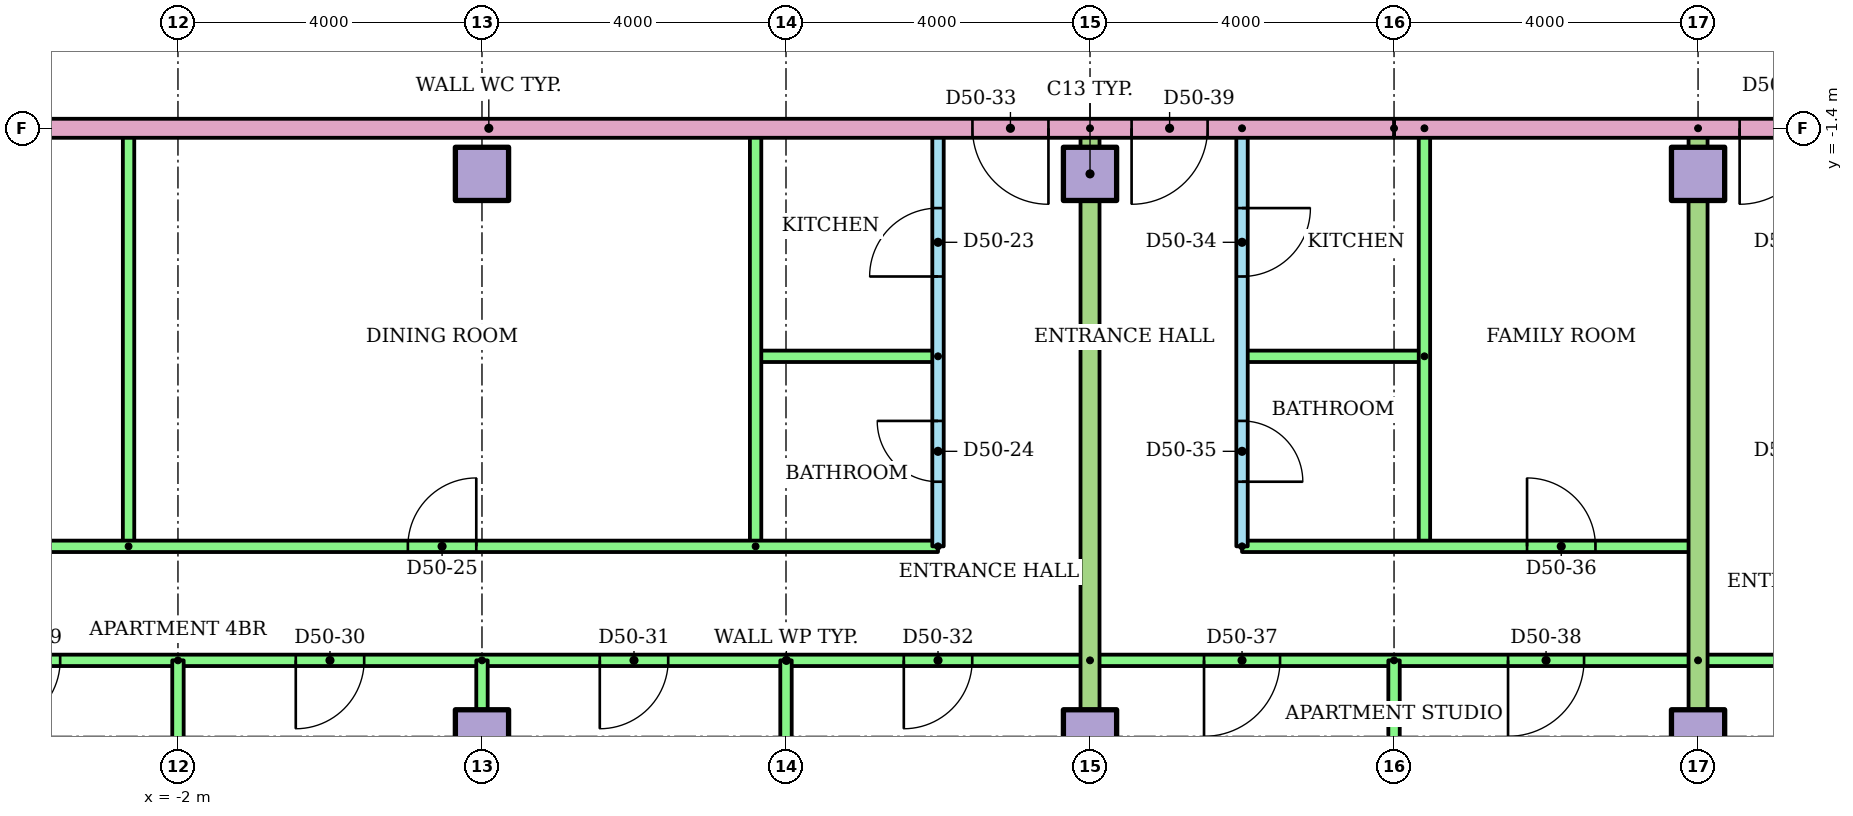
"""IFC4 building model, lengths in metres.
Left out: names, types, materials, properties, quantities, classifications, styles, units other than length and angle.
Written with IfcOpenShell. Run it as: python <this file> out.ifc"""

import sys

from ifc_helpers import new_model, si_unit, direction, frame, frame_2d, origin, origin_2d, place, context, subcontext, project, spatial, rectangle, extrude, element, fill, save


model = new_model("IFC4")
c1 = context("Model", 3, precision=1e-05, world=origin(), true_north=direction((0.0, 1.0)))
c2 = subcontext(c1, "Body", "Model", "MODEL_VIEW")
j1 = project(units=[si_unit("LENGTHUNIT", "METRE"), si_unit("PLANEANGLEUNIT", "RADIAN")], contexts=[c1])
p1 = place(None, origin())
s1 = spatial("IfcSite", under=j1, at=p1, CompositionType="ELEMENT")
p2 = place(p1, origin())
s2 = spatial("IfcBuilding", under=s1, at=p2, CompositionType="ELEMENT")
p3 = place(p2, frame((0.0, 0.0, 190.9)))
s3 = spatial("IfcBuildingStorey", under=s2, at=p3, CompositionType="ELEMENT", Elevation=190.9)
for number, where in (
    (1, (2.0, -9.4, 0.0)),
    (2, (10.0, -9.4, 0.0)),
    (3, (18.0, -9.4, 0.0)),
    (4, (2.0, -2.0, 0.0)),
    (5, (10.0, -2.0, 0.0)),
    (6, (18.0, -2.0, 0.0)),
):
    element("IfcColumn", number, at=place(p3, frame(where)), inside=s3, PredefinedType="COLUMN", context=c2, shape_type="SweptSolid", body=[
        extrude(rectangle(XDim=0.7, YDim=0.7, at=origin_2d()), origin(), (0.0, 0.0, 1.0), 3.2),
    ])
p4 = place(p3, frame((8.0, -6.9, 0.0), z_axis=(0.0, 0.0, 1.0), x_axis=(0.0, 1.0, 0.0)))
e7 = element("IfcWall", 7, at=p4, inside=s3, PredefinedType="PARTITIONING", context=c2, shape_type="SweptSolid", body=[
    extrude(rectangle(XDim=5.5, YDim=0.15, at=frame_2d((2.75, 0.0))), origin(), (0.0, 0.0, 1.0), 2.4),
])
p5 = place(p4, frame((3.55, 0.0, 0.0)))
e8 = element("IfcOpeningElement", 8, at=p5, cuts=e7, PredefinedType="OPENING", context=c2, shape_type="SweptSolid", body=[
    extrude(rectangle(XDim=0.9, YDim=2.1, at=frame_2d((0.45, 1.05))), frame((0.0, 0.085, 0.0), z_axis=(0.0, -1.0, 0.0), x_axis=(1.0, 0.0, 0.0)), (0.0, 0.0, 1.0), 0.17),
])
p6 = place(p4, frame((0.85, 0.0, 0.0)))
e9 = element("IfcOpeningElement", 9, at=p6, cuts=e7, PredefinedType="OPENING", context=c2, shape_type="SweptSolid", body=[
    extrude(rectangle(XDim=0.8, YDim=2.1, at=frame_2d((0.4, 1.05))), frame((0.0, 0.085, 0.0), z_axis=(0.0, -1.0, 0.0), x_axis=(1.0, 0.0, 0.0)), (0.0, 0.0, 1.0), 0.17),
])
p7 = place(p3, frame((8.0, -4.4, 0.0), z_axis=(0.0, 0.0, 1.0), x_axis=(-1.0, 0.0, 0.0)))
e10 = element("IfcWall", 10, at=p7, inside=s3, PredefinedType="PARTITIONING", context=c2, shape_type="SweptSolid", body=[
    extrude(rectangle(XDim=2.4, YDim=0.15, at=frame_2d((1.2, 0.0))), origin(), (0.0, 0.0, 1.0), 2.4),
])
for number, where, z_axis, x_axis in (
    (11, (5.6, -6.9, 0.0), (0.0, 0.0, 1.0), (0.0, 1.0, 0.0)),
    (12, (-2.65, -6.9, 0.0), (0.0, 0.0, 1.0), (0.0, 1.0, 0.0)),
):
    element("IfcWall", number, at=place(p3, frame(where, z_axis=z_axis, x_axis=x_axis)), inside=s3, PredefinedType="PARTITIONING", context=c2, shape_type="SweptSolid", body=[
        extrude(rectangle(XDim=5.5, YDim=0.15, at=frame_2d((2.75, 0.0))), origin(), (0.0, 0.0, 1.0), 2.4),
    ])
p8 = place(p3, frame((-14.0, -6.9, 0.0)))
e13 = element("IfcWall", 13, at=p8, inside=s3, PredefinedType="PARTITIONING", context=c2, shape_type="SweptSolid", body=[
    extrude(rectangle(XDim=22.0, YDim=0.15, at=frame_2d((11.0, 0.0))), origin(), (0.0, 0.0, 1.0), 2.4),
])
p9 = place(p8, frame((15.025, 0.0, 0.0)))
e14 = element("IfcOpeningElement", 14, at=p9, cuts=e13, PredefinedType="OPENING", context=c2, shape_type="SweptSolid", body=[
    extrude(rectangle(XDim=0.9, YDim=2.1, at=frame_2d((0.45, 1.05))), frame((0.0, 0.085, 0.0), z_axis=(0.0, -1.0, 0.0), x_axis=(1.0, 0.0, 0.0)), (0.0, 0.0, 1.0), 0.17),
])
p10 = place(p8, frame((7.65, 0.0, 0.0)))
e15 = element("IfcOpeningElement", 15, at=p10, cuts=e13, PredefinedType="OPENING", context=c2, shape_type="SweptSolid", body=[
    extrude(rectangle(XDim=0.9, YDim=2.1, at=frame_2d((0.45, 1.05))), frame((0.0, 0.085, 0.0), z_axis=(0.0, -1.0, 0.0), x_axis=(1.0, 0.0, 0.0)), (0.0, 0.0, 1.0), 0.17),
])
p11 = place(p8, frame((1.975, 0.0, 0.0)))
e16 = element("IfcOpeningElement", 16, at=p11, cuts=e13, PredefinedType="OPENING", context=c2, shape_type="SweptSolid", body=[
    extrude(rectangle(XDim=0.9, YDim=2.1, at=frame_2d((0.45, 1.05))), frame((0.0, 0.085, 0.0), z_axis=(0.0, -1.0, 0.0), x_axis=(1.0, 0.0, 0.0)), (0.0, 0.0, 1.0), 0.17),
])
p12 = place(p3, frame((10.0, -8.4, 0.0), z_axis=(0.0, 0.0, 1.0), x_axis=(-1.0, 0.0, 0.0)))
e17 = element("IfcWall", 17, at=p12, inside=s3, PredefinedType="PARTITIONING", context=c2, shape_type="SweptSolid", body=[
    extrude(rectangle(XDim=24.0, YDim=0.15, at=frame_2d((12.0, 0.0))), origin(), (0.0, 0.0, 1.0), 2.4),
])
p13 = place(p12, frame((19.5, 0.0, 0.0)))
e18 = element("IfcOpeningElement", 18, at=p13, cuts=e17, PredefinedType="OPENING", context=c2, shape_type="SweptSolid", body=[
    extrude(rectangle(XDim=1.0, YDim=2.1, at=frame_2d((0.5, 1.05))), frame((0.0, 0.085, 0.0), z_axis=(0.0, -1.0, 0.0), x_axis=(1.0, 0.0, 0.0)), (0.0, 0.0, 1.0), 0.17),
])
p14 = place(p12, frame((13.55, 0.0, 0.0)))
e19 = element("IfcOpeningElement", 19, at=p14, cuts=e17, PredefinedType="OPENING", context=c2, shape_type="SweptSolid", body=[
    extrude(rectangle(XDim=0.9, YDim=2.1, at=frame_2d((0.45, 1.05))), frame((0.0, 0.085, 0.0), z_axis=(0.0, -1.0, 0.0), x_axis=(1.0, 0.0, 0.0)), (0.0, 0.0, 1.0), 0.17),
])
p15 = place(p12, frame((9.55, 0.0, 0.0)))
e20 = element("IfcOpeningElement", 20, at=p15, cuts=e17, PredefinedType="OPENING", context=c2, shape_type="SweptSolid", body=[
    extrude(rectangle(XDim=0.9, YDim=2.1, at=frame_2d((0.45, 1.05))), frame((0.0, 0.085, 0.0), z_axis=(0.0, -1.0, 0.0), x_axis=(1.0, 0.0, 0.0)), (0.0, 0.0, 1.0), 0.17),
])
p16 = place(p12, frame((5.55, 0.0, 0.0)))
e21 = element("IfcOpeningElement", 21, at=p16, cuts=e17, PredefinedType="OPENING", context=c2, shape_type="SweptSolid", body=[
    extrude(rectangle(XDim=0.9, YDim=2.1, at=frame_2d((0.45, 1.05))), frame((0.0, 0.085, 0.0), z_axis=(0.0, -1.0, 0.0), x_axis=(1.0, 0.0, 0.0)), (0.0, 0.0, 1.0), 0.17),
])
p17 = place(p12, frame((1.55, 0.0, 0.0)))
e22 = element("IfcOpeningElement", 22, at=p17, cuts=e17, PredefinedType="OPENING", context=c2, shape_type="SweptSolid", body=[
    extrude(rectangle(XDim=0.9, YDim=2.1, at=frame_2d((0.45, 1.05))), frame((0.0, 0.085, 0.0), z_axis=(0.0, -1.0, 0.0), x_axis=(1.0, 0.0, 0.0)), (0.0, 0.0, 1.0), 0.17),
])
p18 = place(p3, frame((-2.0, -8.4, 0.0), z_axis=(0.0, 0.0, 1.0), x_axis=(0.0, -1.0, 0.0)))
e23 = element("IfcWall", 23, at=p18, inside=s3, PredefinedType="PARTITIONING", context=c2, shape_type="SweptSolid", body=[
    extrude(rectangle(XDim=8.021, YDim=0.15, at=frame_2d((4.01, 0.0))), origin(), (0.0, 0.0, 1.0), 2.4),
])
p19 = place(p3, frame((2.0, -8.4, 0.0), z_axis=(0.0, 0.0, 1.0), x_axis=(0.0, -1.0, 0.0)))
e24 = element("IfcWall", 24, at=p19, inside=s3, PredefinedType="PARTITIONING", context=c2, shape_type="SweptSolid", body=[
    extrude(rectangle(XDim=8.01, YDim=0.15, at=frame_2d((4.005, 0.0))), origin(), (0.0, 0.0, 1.0), 2.4),
])
p20 = place(p3, frame((6.0, -8.4, 0.0), z_axis=(0.0, 0.0, 1.0), x_axis=(0.0, -1.0, 0.0)))
e25 = element("IfcWall", 25, at=p20, inside=s3, PredefinedType="PARTITIONING", context=c2, shape_type="SweptSolid", body=[
    extrude(rectangle(XDim=8.021, YDim=0.15, at=frame_2d((4.01, 0.0))), origin(), (0.0, 0.0, 1.0), 2.4),
])
p21 = place(p3, frame((12.0, -1.4, 0.0), z_axis=(0.0, 0.0, 1.0), x_axis=(0.0, -1.0, 0.0)))
e26 = element("IfcWall", 26, at=p21, inside=s3, PredefinedType="PARTITIONING", context=c2, shape_type="SweptSolid", body=[
    extrude(rectangle(XDim=5.5, YDim=0.15, at=frame_2d((2.75, 0.0))), origin(), (0.0, 0.0, 1.0), 2.4),
])
p22 = place(p21, frame((1.05, 0.0, 0.0)))
e27 = element("IfcOpeningElement", 27, at=p22, cuts=e26, PredefinedType="OPENING", context=c2, shape_type="SweptSolid", body=[
    extrude(rectangle(XDim=0.9, YDim=2.1, at=frame_2d((0.45, 1.05))), frame((0.0, 0.085, 0.0), z_axis=(0.0, -1.0, 0.0), x_axis=(1.0, 0.0, 0.0)), (0.0, 0.0, 1.0), 0.17),
])
p23 = place(p21, frame((3.85, 0.0, 0.0)))
e28 = element("IfcOpeningElement", 28, at=p23, cuts=e26, PredefinedType="OPENING", context=c2, shape_type="SweptSolid", body=[
    extrude(rectangle(XDim=0.8, YDim=2.1, at=frame_2d((0.4, 1.05))), frame((0.0, 0.085, 0.0), z_axis=(0.0, -1.0, 0.0), x_axis=(1.0, 0.0, 0.0)), (0.0, 0.0, 1.0), 0.17),
])
p24 = place(p3, frame((14.4, -4.4, 0.0), z_axis=(0.0, 0.0, 1.0), x_axis=(-1.0, 0.0, 0.0)))
e29 = element("IfcWall", 29, at=p24, inside=s3, PredefinedType="PARTITIONING", context=c2, shape_type="SweptSolid", body=[
    extrude(rectangle(XDim=2.4, YDim=0.15, at=frame_2d((1.2, 0.0))), origin(), (0.0, 0.0, 1.0), 2.4),
])
p25 = place(p3, frame((14.4, -1.4, 0.0), z_axis=(0.0, 0.0, 1.0), x_axis=(0.0, -1.0, 0.0)))
e30 = element("IfcWall", 30, at=p25, inside=s3, PredefinedType="PARTITIONING", context=c2, shape_type="SweptSolid", body=[
    extrude(rectangle(XDim=5.5, YDim=0.15, at=frame_2d((2.75, 0.0))), origin(), (0.0, 0.0, 1.0), 2.4),
])
p26 = place(p3, frame((12.0, -6.9, 0.0)))
e31 = element("IfcWall", 31, at=p26, inside=s3, PredefinedType="PARTITIONING", context=c2, shape_type="SweptSolid", body=[
    extrude(rectangle(XDim=6.0, YDim=0.15, at=frame_2d((3.0, 0.0))), origin(), (0.0, 0.0, 1.0), 2.4),
])
p27 = place(p26, frame((3.75, 0.0, 0.0)))
e32 = element("IfcOpeningElement", 32, at=p27, cuts=e31, PredefinedType="OPENING", context=c2, shape_type="SweptSolid", body=[
    extrude(rectangle(XDim=0.9, YDim=2.1, at=frame_2d((0.45, 1.05))), frame((0.0, 0.085, 0.0), z_axis=(0.0, -1.0, 0.0), x_axis=(1.0, 0.0, 0.0)), (0.0, 0.0, 1.0), 0.17),
])
p28 = place(p3, frame((18.0, -8.4, 0.0), z_axis=(0.0, 0.0, 1.0), x_axis=(-1.0, 0.0, 0.0)))
e33 = element("IfcWall", 33, at=p28, inside=s3, PredefinedType="PARTITIONING", context=c2, shape_type="SweptSolid", body=[
    extrude(rectangle(XDim=8.0, YDim=0.15, at=frame_2d((4.0, 0.0))), origin(), (0.0, 0.0, 1.0), 2.4),
])
p29 = place(p28, frame((5.5, 0.0, 0.0)))
e34 = element("IfcOpeningElement", 34, at=p29, cuts=e33, PredefinedType="OPENING", context=c2, shape_type="SweptSolid", body=[
    extrude(rectangle(XDim=1.0, YDim=2.1, at=frame_2d((0.5, 1.05))), frame((0.0, 0.085, 0.0), z_axis=(0.0, -1.0, 0.0), x_axis=(1.0, 0.0, 0.0)), (0.0, 0.0, 1.0), 0.17),
])
p30 = place(p28, frame((1.5, 0.0, 0.0)))
e35 = element("IfcOpeningElement", 35, at=p30, cuts=e33, PredefinedType="OPENING", context=c2, shape_type="SweptSolid", body=[
    extrude(rectangle(XDim=1.0, YDim=2.1, at=frame_2d((0.5, 1.05))), frame((0.0, 0.085, 0.0), z_axis=(0.0, -1.0, 0.0), x_axis=(1.0, 0.0, 0.0)), (0.0, 0.0, 1.0), 0.17),
])
p31 = place(p3, frame((14.0, -8.4, 0.0), z_axis=(0.0, 0.0, 1.0), x_axis=(0.0, -1.0, 0.0)))
e36 = element("IfcWall", 36, at=p31, inside=s3, PredefinedType="PARTITIONING", context=c2, shape_type="SweptSolid", body=[
    extrude(rectangle(XDim=8.021, YDim=0.15, at=frame_2d((4.01, 0.0))), origin(), (0.0, 0.0, 1.0), 2.4),
])
p32 = place(p3, frame((10.0, -1.4, 0.0), z_axis=(0.0, 0.0, 1.0), x_axis=(0.0, -1.0, 0.0)))
e37 = element("IfcWall", 37, at=p32, inside=s3, PredefinedType="PARTITIONING", context=c2, shape_type="SweptSolid", body=[
    extrude(rectangle(XDim=15.01, YDim=0.25, at=frame_2d((7.505, 0.0))), origin(), (0.0, 0.0, 1.0), 2.4),
])
p33 = place(p3, frame((36.82, -8.4, 0.0), z_axis=(0.0, 0.0, 1.0), x_axis=(-1.0, 0.0, 0.0)))
e38 = element("IfcWall", 38, at=p33, inside=s3, PredefinedType="PARTITIONING", context=c2, shape_type="SweptSolid", body=[
    extrude(rectangle(XDim=18.82, YDim=0.15, at=frame_2d((9.41, 0.0))), origin(), (0.0, 0.0, 1.0), 2.4),
])
p34 = place(p33, frame((16.37, 0.0, 0.0)))
e39 = element("IfcOpeningElement", 39, at=p34, cuts=e38, PredefinedType="OPENING", context=c2, shape_type="SweptSolid", body=[
    extrude(rectangle(XDim=0.9, YDim=2.1, at=frame_2d((0.45, 1.05))), frame((0.0, 0.085, 0.0), z_axis=(0.0, -1.0, 0.0), x_axis=(1.0, 0.0, 0.0)), (0.0, 0.0, 1.0), 0.17),
])
p35 = place(p33, frame((12.37, 0.0, 0.0)))
e40 = element("IfcOpeningElement", 40, at=p35, cuts=e38, PredefinedType="OPENING", context=c2, shape_type="SweptSolid", body=[
    extrude(rectangle(XDim=0.9, YDim=2.1, at=frame_2d((0.45, 1.05))), frame((0.0, 0.085, 0.0), z_axis=(0.0, -1.0, 0.0), x_axis=(1.0, 0.0, 0.0)), (0.0, 0.0, 1.0), 0.17),
])
p36 = place(p33, frame((7.27, 0.0, 0.0)))
e41 = element("IfcOpeningElement", 41, at=p36, cuts=e38, PredefinedType="OPENING", context=c2, shape_type="SweptSolid", body=[
    extrude(rectangle(XDim=1.0, YDim=2.1, at=frame_2d((0.5, 1.05))), frame((0.0, 0.085, 0.0), z_axis=(0.0, -1.0, 0.0), x_axis=(1.0, 0.0, 0.0)), (0.0, 0.0, 1.0), 0.17),
])
p37 = place(p33, frame((1.373, 0.0, 0.0)))
e42 = element("IfcOpeningElement", 42, at=p37, cuts=e38, PredefinedType="OPENING", context=c2, shape_type="SweptSolid", body=[
    extrude(rectangle(XDim=0.9, YDim=2.1, at=frame_2d((0.45, 1.05))), frame((0.0, 0.085, 0.0), z_axis=(0.0, -1.0, 0.0), x_axis=(1.0, 0.0, 0.0)), (0.0, 0.0, 1.0), 0.17),
])
p38 = place(p3, frame((18.0, -1.4, 0.0), z_axis=(0.0, 0.0, 1.0), x_axis=(0.0, -1.0, 0.0)))
e43 = element("IfcWall", 43, at=p38, inside=s3, PredefinedType="PARTITIONING", context=c2, shape_type="SweptSolid", body=[
    extrude(rectangle(XDim=15.01, YDim=0.25, at=frame_2d((7.505, 0.0))), origin(), (0.0, 0.0, 1.0), 2.4),
])
p39 = place(p3, frame((29.0, -1.4, 0.0), z_axis=(0.0, 0.0, 1.0), x_axis=(-1.0, 0.0, 0.0)))
e44 = element("IfcWall", 44, at=p39, inside=s3, PredefinedType="PARTITIONING", context=c2, shape_type="SweptSolid", body=[
    extrude(rectangle(XDim=15.0, YDim=0.25, at=frame_2d((7.5, 0.0))), origin(), (0.0, 0.0, 1.0), 2.4),
])
p40 = place(p39, frame((9.453, 0.0, 0.0)))
e45 = element("IfcOpeningElement", 45, at=p40, cuts=e44, PredefinedType="OPENING", context=c2, shape_type="SweptSolid", body=[
    extrude(rectangle(XDim=1.0, YDim=2.1, at=frame_2d((0.5, 1.05))), frame((0.0, 0.135, 0.0), z_axis=(0.0, -1.0, 0.0), x_axis=(1.0, 0.0, 0.0)), (0.0, 0.0, 1.0), 0.27),
])
p41 = place(p3, frame((14.0, -1.4, 0.0), z_axis=(0.0, 0.0, 1.0), x_axis=(-1.0, 0.0, 0.0)))
e46 = element("IfcWall", 46, at=p41, inside=s3, PredefinedType="PARTITIONING", context=c2, shape_type="SweptSolid", body=[
    extrude(rectangle(XDim=28.0, YDim=0.25, at=frame_2d((14.0, 0.0))), origin(), (0.0, 0.0, 1.0), 2.4),
])
p42 = place(p41, frame((4.547, 0.0, 0.0)))
e47 = element("IfcOpeningElement", 47, at=p42, cuts=e46, PredefinedType="OPENING", context=c2, shape_type="SweptSolid", body=[
    extrude(rectangle(XDim=1.0, YDim=2.1, at=frame_2d((0.5, 1.05))), frame((0.0, 0.135, 0.0), z_axis=(0.0, -1.0, 0.0), x_axis=(1.0, 0.0, 0.0)), (0.0, 0.0, 1.0), 0.27),
])
p43 = place(p41, frame((2.453, 0.0, 0.0)))
e48 = element("IfcOpeningElement", 48, at=p43, cuts=e46, PredefinedType="OPENING", context=c2, shape_type="SweptSolid", body=[
    extrude(rectangle(XDim=1.0, YDim=2.1, at=frame_2d((0.5, 1.05))), frame((0.0, 0.135, 0.0), z_axis=(0.0, -1.0, 0.0), x_axis=(1.0, 0.0, 0.0)), (0.0, 0.0, 1.0), 0.27),
])
p44 = place(p5, origin())
e49 = element("IfcDoor", 49, at=p44, inside=s3, OperationType="SINGLE_SWING_LEFT", PredefinedType="DOOR", context=c2, shape_type="SweptSolid", body=[
    extrude(rectangle(XDim=0.9, YDim=2.1, at=frame_2d((0.45, 1.05))), frame((0.0, 0.025, 0.0), z_axis=(0.0, -1.0, 0.0), x_axis=(1.0, 0.0, 0.0)), (0.0, 0.0, 1.0), 0.05),
])
fill(e8, e49)
p45 = place(p6, origin())
e50 = element("IfcDoor", 50, at=p45, inside=s3, OperationType="SINGLE_SWING_RIGHT", PredefinedType="DOOR", context=c2, shape_type="SweptSolid", body=[
    extrude(rectangle(XDim=0.8, YDim=2.1, at=frame_2d((0.4, 1.05))), frame((0.0, 0.025, 0.0), z_axis=(0.0, -1.0, 0.0), x_axis=(1.0, 0.0, 0.0)), (0.0, 0.0, 1.0), 0.05),
])
fill(e9, e50)
p46 = place(p9, origin())
e51 = element("IfcDoor", 51, at=p46, inside=s3, OperationType="SINGLE_SWING_RIGHT", PredefinedType="DOOR", context=c2, shape_type="SweptSolid", body=[
    extrude(rectangle(XDim=0.9, YDim=2.1, at=frame_2d((0.45, 1.05))), frame((0.0, 0.025, 0.0), z_axis=(0.0, -1.0, 0.0), x_axis=(1.0, 0.0, 0.0)), (0.0, 0.0, 1.0), 0.05),
])
fill(e14, e51)
p47 = place(p14, origin())
e52 = element("IfcDoor", 52, at=p47, inside=s3, OperationType="SINGLE_SWING_RIGHT", PredefinedType="DOOR", context=c2, shape_type="SweptSolid", body=[
    extrude(rectangle(XDim=0.9, YDim=2.1, at=frame_2d((0.45, 1.05))), frame((0.0, 0.025, 0.0), z_axis=(0.0, -1.0, 0.0), x_axis=(1.0, 0.0, 0.0)), (0.0, 0.0, 1.0), 0.05),
])
fill(e19, e52)
p48 = place(p15, origin())
e53 = element("IfcDoor", 53, at=p48, inside=s3, OperationType="SINGLE_SWING_RIGHT", PredefinedType="DOOR", context=c2, shape_type="SweptSolid", body=[
    extrude(rectangle(XDim=0.9, YDim=2.1, at=frame_2d((0.45, 1.05))), frame((0.0, 0.025, 0.0), z_axis=(0.0, -1.0, 0.0), x_axis=(1.0, 0.0, 0.0)), (0.0, 0.0, 1.0), 0.05),
])
fill(e20, e53)
p49 = place(p16, origin())
e54 = element("IfcDoor", 54, at=p49, inside=s3, OperationType="SINGLE_SWING_RIGHT", PredefinedType="DOOR", context=c2, shape_type="SweptSolid", body=[
    extrude(rectangle(XDim=0.9, YDim=2.1, at=frame_2d((0.45, 1.05))), frame((0.0, 0.025, 0.0), z_axis=(0.0, -1.0, 0.0), x_axis=(1.0, 0.0, 0.0)), (0.0, 0.0, 1.0), 0.05),
])
fill(e21, e54)
p50 = place(p17, origin())
e55 = element("IfcDoor", 55, at=p50, inside=s3, OperationType="SINGLE_SWING_RIGHT", PredefinedType="DOOR", context=c2, shape_type="SweptSolid", body=[
    extrude(rectangle(XDim=0.9, YDim=2.1, at=frame_2d((0.45, 1.05))), frame((0.0, 0.025, 0.0), z_axis=(0.0, -1.0, 0.0), x_axis=(1.0, 0.0, 0.0)), (0.0, 0.0, 1.0), 0.05),
])
fill(e22, e55)
p51 = place(p42, origin())
e56 = element("IfcDoor", 56, at=p51, inside=s3, OperationType="SINGLE_SWING_LEFT", PredefinedType="DOOR", context=c2, shape_type="SweptSolid", body=[
    extrude(rectangle(XDim=1.0, YDim=2.1, at=frame_2d((0.5, 1.05))), frame((0.0, 0.025, 0.0), z_axis=(0.0, -1.0, 0.0), x_axis=(1.0, 0.0, 0.0)), (0.0, 0.0, 1.0), 0.05),
])
fill(e47, e56)
p52 = place(p22, origin())
e57 = element("IfcDoor", 57, at=p52, inside=s3, OperationType="SINGLE_SWING_LEFT", PredefinedType="DOOR", context=c2, shape_type="SweptSolid", body=[
    extrude(rectangle(XDim=0.9, YDim=2.1, at=frame_2d((0.45, 1.05))), frame((0.0, 0.025, 0.0), z_axis=(0.0, -1.0, 0.0), x_axis=(1.0, 0.0, 0.0)), (0.0, 0.0, 1.0), 0.05),
])
fill(e27, e57)
p53 = place(p23, origin())
e58 = element("IfcDoor", 58, at=p53, inside=s3, OperationType="SINGLE_SWING_RIGHT", PredefinedType="DOOR", context=c2, shape_type="SweptSolid", body=[
    extrude(rectangle(XDim=0.8, YDim=2.1, at=frame_2d((0.4, 1.05))), frame((0.0, 0.025, 0.0), z_axis=(0.0, -1.0, 0.0), x_axis=(1.0, 0.0, 0.0)), (0.0, 0.0, 1.0), 0.05),
])
fill(e28, e58)
p54 = place(p27, origin())
e59 = element("IfcDoor", 59, at=p54, inside=s3, OperationType="SINGLE_SWING_LEFT", PredefinedType="DOOR", context=c2, shape_type="SweptSolid", body=[
    extrude(rectangle(XDim=0.9, YDim=2.1, at=frame_2d((0.45, 1.05))), frame((0.0, 0.025, 0.0), z_axis=(0.0, -1.0, 0.0), x_axis=(1.0, 0.0, 0.0)), (0.0, 0.0, 1.0), 0.05),
])
fill(e32, e59)
p55 = place(p29, origin())
e60 = element("IfcDoor", 60, at=p55, inside=s3, OperationType="SINGLE_SWING_RIGHT", PredefinedType="DOOR", context=c2, shape_type="SweptSolid", body=[
    extrude(rectangle(XDim=1.0, YDim=2.1, at=frame_2d((0.5, 1.05))), frame((0.0, 0.025, 0.0), z_axis=(0.0, -1.0, 0.0), x_axis=(1.0, 0.0, 0.0)), (0.0, 0.0, 1.0), 0.05),
])
fill(e34, e60)
p56 = place(p30, origin())
e61 = element("IfcDoor", 61, at=p56, inside=s3, OperationType="SINGLE_SWING_RIGHT", PredefinedType="DOOR", context=c2, shape_type="SweptSolid", body=[
    extrude(rectangle(XDim=1.0, YDim=2.1, at=frame_2d((0.5, 1.05))), frame((0.0, 0.025, 0.0), z_axis=(0.0, -1.0, 0.0), x_axis=(1.0, 0.0, 0.0)), (0.0, 0.0, 1.0), 0.05),
])
fill(e35, e61)
p57 = place(p43, origin())
e62 = element("IfcDoor", 62, at=p57, inside=s3, OperationType="SINGLE_SWING_RIGHT", PredefinedType="DOOR", context=c2, shape_type="SweptSolid", body=[
    extrude(rectangle(XDim=1.0, YDim=2.1, at=frame_2d((0.5, 1.05))), frame((0.0, 0.025, 0.0), z_axis=(0.0, -1.0, 0.0), x_axis=(1.0, 0.0, 0.0)), (0.0, 0.0, 1.0), 0.05),
])
fill(e48, e62)
p58 = place(p40, origin())
e63 = element("IfcDoor", 63, at=p58, inside=s3, OperationType="SINGLE_SWING_RIGHT", PredefinedType="DOOR", context=c2, shape_type="SweptSolid", body=[
    extrude(rectangle(XDim=1.0, YDim=2.1, at=frame_2d((0.5, 1.05))), frame((0.0, 0.025, 0.0), z_axis=(0.0, -1.0, 0.0), x_axis=(1.0, 0.0, 0.0)), (0.0, 0.0, 1.0), 0.05),
])
fill(e45, e63)
save(model, sys.argv[1])
